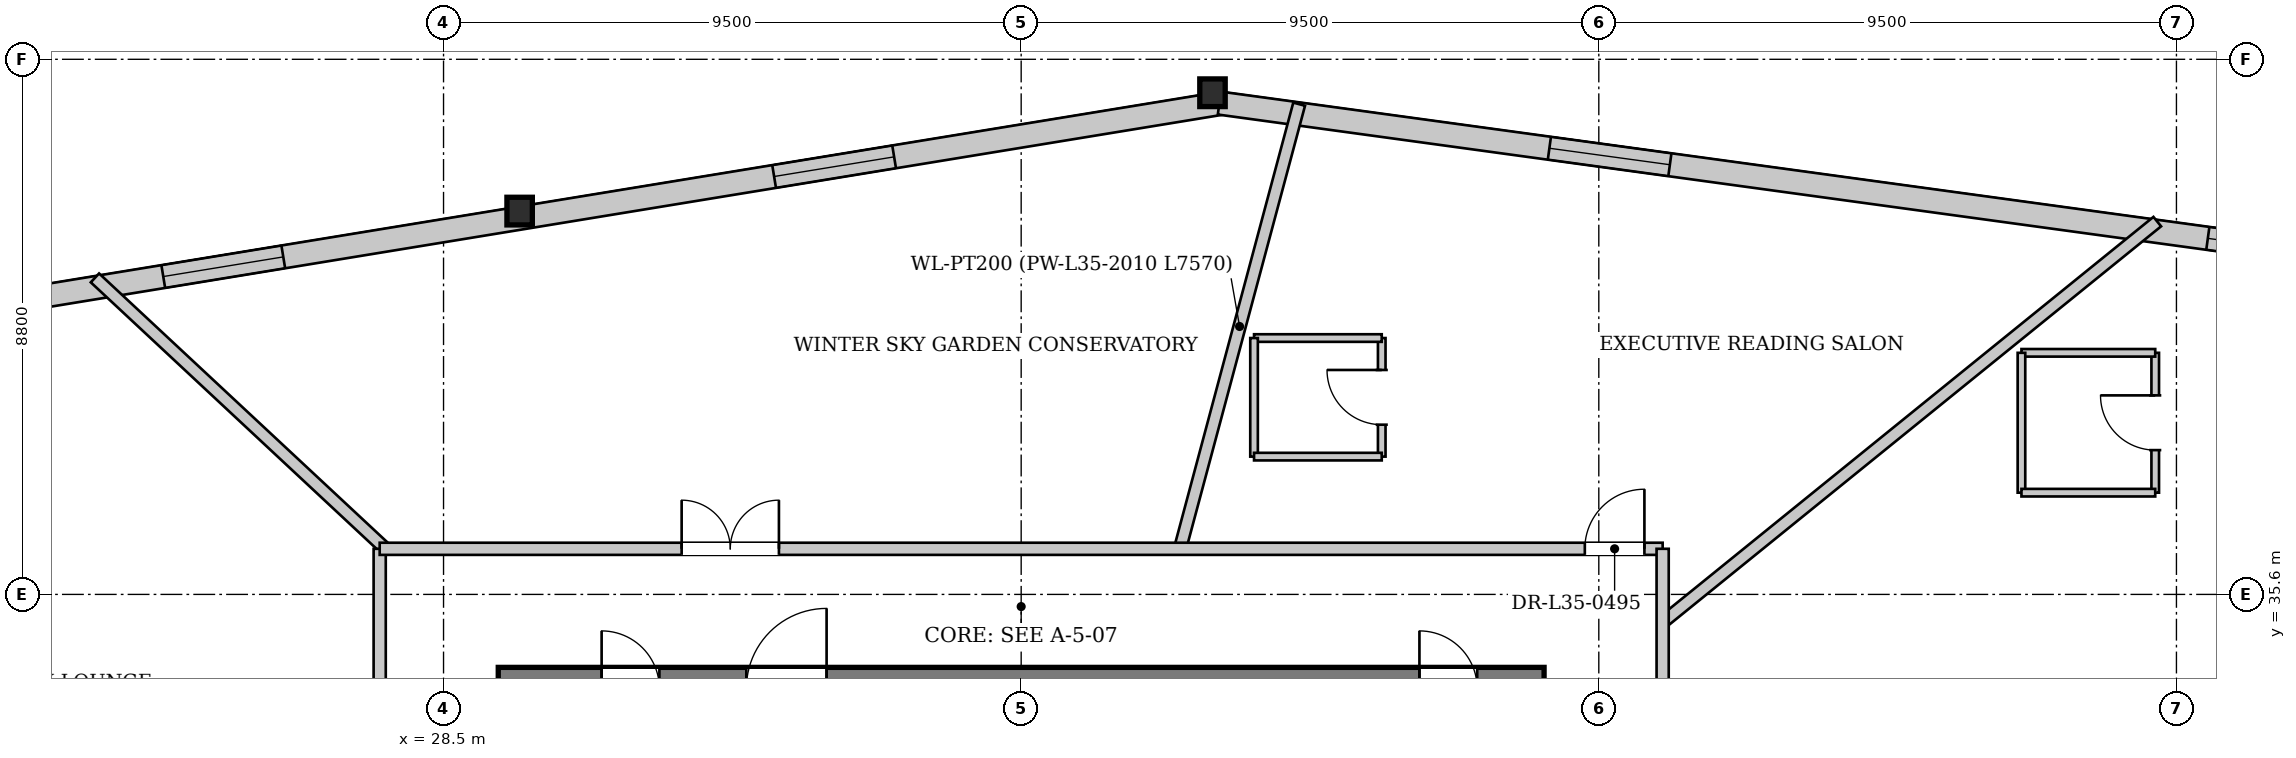
"""IFC4 building model, lengths in metres.
Left out: names, types, materials, properties, quantities, classifications, styles, units other than length and angle.
Written with IfcOpenShell. Run it as: python <this file> out.ifc"""

import sys

from ifc_helpers import new_model, si_unit, direction, frame, frame_2d, origin, origin_2d, place, context, subcontext, project, spatial, rectangle, i_section, extrude, source, transform, mapped, element, fill, save


model = new_model("IFC4")
c1 = context("Model", 3, precision=1e-05, world=origin(), true_north=direction((0.0, 1.0)))
c2 = subcontext(c1, "Body", "Model", "MODEL_VIEW")
j1 = project(units=[si_unit("LENGTHUNIT", "METRE"), si_unit("PLANEANGLEUNIT", "RADIAN")], contexts=[c1])
p1 = place(None, origin())
s1 = spatial("IfcSite", under=j1, at=p1, CompositionType="ELEMENT")
p2 = place(p1, origin())
s2 = spatial("IfcBuilding", under=s1, at=p2, CompositionType="ELEMENT")
p3 = place(p2, frame((0.0, 0.0, 134.1)))
s3 = spatial("IfcBuildingStorey", under=s2, at=p3, CompositionType="ELEMENT", Elevation=134.1)
m1 = source(origin(), c2, "Body", "SweptSolid", [
    extrude(i_section(OverallWidth=0.418, OverallDepth=0.455, WebThickness=0.038, FlangeThickness=0.059, at=origin_2d()), origin(), (0.0, 0.0, 1.0), 3.845),
])
p4 = place(p3, frame((41.286, 43.868, 0.0), z_axis=(-0.072380782417, -0.009587279074, 0.997330991405), x_axis=(0.131309262707, -0.99134145355, 0.0)))
e1 = element("IfcColumn", 1, at=p4, inside=s3, PredefinedType="COLUMN", context=c2, shape_type="MappedRepresentation", body=[
    mapped(m1, transform((0.0, 0.0, 0.0), x_axis=(1.0, 0.0, 0.0), y_axis=(0.0, 1.0, 0.0), z_axis=(0.0, 0.0, 1.0), scale=1.0)),
])
m2 = source(origin(), c2, "Body", "SweptSolid", [
    extrude(i_section(OverallWidth=0.418, OverallDepth=0.455, WebThickness=0.038, FlangeThickness=0.059, at=origin_2d()), origin(), (0.0, 0.0, 1.0), 3.847),
])
p5 = place(p3, frame((29.87, 41.999, 0.0), z_axis=(-0.061495980283, -0.049437944933, 0.996882206687), x_axis=(0.626556911825, -0.779375670806, 0.0)))
e2 = element("IfcColumn", 2, at=p5, inside=s3, PredefinedType="COLUMN", context=c2, shape_type="MappedRepresentation", body=[
    mapped(m2, transform((0.0, 0.0, 0.0), x_axis=(1.0, 0.0, 0.0), y_axis=(0.0, 1.0, 0.0), z_axis=(0.0, 0.0, 1.0), scale=1.0)),
])
p6 = place(p3, frame((18.485, 39.942, 0.0), z_axis=(0.0, 0.0, 1.0), x_axis=(0.986854577997, 0.161610772806, 0.0)))
e3 = element("IfcWall", 3, at=p6, inside=s3, PredefinedType="SOLIDWALL", context=c2, shape_type="SweptSolid", body=[
    extrude(rectangle(XDim=23.136, YDim=0.38, at=frame_2d((11.568, 0.0))), origin(), (0.0, 0.0, 1.0), 3.142),
])
p7 = place(p6, frame((5.478, 0.0, 0.222)))
e4 = element("IfcOpeningElement", 4, at=p7, cuts=e3, PredefinedType="OPENING", context=c2, shape_type="SweptSolid", body=[
    extrude(rectangle(XDim=2.0, YDim=2.8, at=frame_2d((1.0, 1.4))), frame((0.0, 0.2, 0.0), z_axis=(0.0, -1.0, 0.0), x_axis=(1.0, 0.0, 0.0)), (0.0, 0.0, 1.0), 0.4),
])
p8 = place(p6, frame((15.658, 0.0, 0.222)))
e5 = element("IfcOpeningElement", 5, at=p8, cuts=e3, PredefinedType="OPENING", context=c2, shape_type="SweptSolid", body=[
    extrude(rectangle(XDim=2.0, YDim=2.8, at=frame_2d((1.0, 1.4))), frame((0.0, 0.2, 0.0), z_axis=(0.0, -1.0, 0.0), x_axis=(1.0, 0.0, 0.0)), (0.0, 0.0, 1.0), 0.4),
])
p9 = place(p3, frame((41.26, 43.68, 0.0), z_axis=(0.0, 0.0, 1.0), x_axis=(0.990765133222, -0.135589272404, 0.0)))
e6 = element("IfcWall", 6, at=p9, inside=s3, PredefinedType="SOLIDWALL", context=c2, shape_type="SweptSolid", body=[
    extrude(rectangle(XDim=23.136, YDim=0.38, at=frame_2d((11.568, 0.0))), origin(), (0.0, 0.0, 1.0), 3.142),
])
p10 = place(p9, frame((5.478, 0.0, 0.222)))
e7 = element("IfcOpeningElement", 7, at=p10, cuts=e6, PredefinedType="OPENING", context=c2, shape_type="SweptSolid", body=[
    extrude(rectangle(XDim=2.0, YDim=2.8, at=frame_2d((1.0, 1.4))), frame((0.0, 0.2, 0.0), z_axis=(0.0, -1.0, 0.0), x_axis=(1.0, 0.0, 0.0)), (0.0, 0.0, 1.0), 0.4),
])
p11 = place(p9, frame((16.408, 0.0, 0.222)))
e8 = element("IfcOpeningElement", 8, at=p11, cuts=e6, PredefinedType="OPENING", context=c2, shape_type="SweptSolid", body=[
    extrude(rectangle(XDim=2.0, YDim=2.8, at=frame_2d((1.0, 1.4))), frame((0.0, 0.2, 0.0), z_axis=(0.0, -1.0, 0.0), x_axis=(1.0, 0.0, 0.0)), (0.0, 0.0, 1.0), 0.4),
])
p12 = place(p3, frame((65.586, 37.457, 0.0), z_axis=(0.0, 0.0, 1.0), x_axis=(-0.552197199058, -0.833713531947, 0.0)))
e9 = element("IfcWall", 9, at=p12, inside=s3, PredefinedType="SOLIDWALL", context=c2, shape_type="SweptSolid", body=[
    extrude(rectangle(XDim=23.726, YDim=0.38, at=frame_2d((11.863, 0.0))), origin(), (0.0, 0.0, 1.0), 3.142),
])
p13 = place(p12, frame((5.643, 0.0, 0.222)))
e10 = element("IfcOpeningElement", 10, at=p13, cuts=e9, PredefinedType="OPENING", context=c2, shape_type="SweptSolid", body=[
    extrude(rectangle(XDim=2.0, YDim=2.8, at=frame_2d((1.0, 1.4))), frame((0.0, 0.2, 0.0), z_axis=(0.0, -1.0, 0.0), x_axis=(1.0, 0.0, 0.0)), (0.0, 0.0, 1.0), 0.4),
])
p14 = place(p12, frame((16.082, 0.0, 0.222)))
e11 = element("IfcOpeningElement", 11, at=p14, cuts=e9, PredefinedType="OPENING", context=c2, shape_type="SweptSolid", body=[
    extrude(rectangle(XDim=2.0, YDim=2.8, at=frame_2d((1.0, 1.4))), frame((0.0, 0.2, 0.0), z_axis=(0.0, -1.0, 0.0), x_axis=(1.0, 0.0, 0.0)), (0.0, 0.0, 1.0), 0.4),
])
p15 = place(p3, frame((29.4, 34.05, 0.0), z_axis=(0.0, 0.0, 1.0), x_axis=(1.0, 0.0, 0.0)))
e12 = element("IfcWall", 12, at=p15, inside=s3, PredefinedType="SHEAR", context=c2, shape_type="SweptSolid", body=[
    extrude(rectangle(XDim=17.2, YDim=0.7, at=frame_2d((8.6, 0.0))), origin(), (0.0, 0.0, 1.0), 3.75),
])
p16 = place(p15, frame((1.7, 0.0, 0.0)))
e13 = element("IfcOpeningElement", 13, at=p16, cuts=e12, PredefinedType="OPENING", context=c2, shape_type="SweptSolid", body=[
    extrude(rectangle(XDim=0.95, YDim=2.1, at=frame_2d((0.475, 1.05))), frame((0.0, 0.36, 0.0), z_axis=(0.0, -1.0, 0.0), x_axis=(1.0, 0.0, 0.0)), (0.0, 0.0, 1.0), 0.72),
])
p17 = place(p15, frame((4.08, 0.0, 0.0)))
e14 = element("IfcOpeningElement", 14, at=p17, cuts=e12, PredefinedType="OPENING", context=c2, shape_type="SweptSolid", body=[
    extrude(rectangle(XDim=1.32, YDim=2.2, at=frame_2d((0.66, 1.1))), frame((0.0, 0.36, 0.0), z_axis=(0.0, -1.0, 0.0), x_axis=(1.0, 0.0, 0.0)), (0.0, 0.0, 1.0), 0.72),
])
p18 = place(p15, frame((15.15, 0.0, 0.0)))
e15 = element("IfcOpeningElement", 15, at=p18, cuts=e12, PredefinedType="OPENING", context=c2, shape_type="SweptSolid", body=[
    extrude(rectangle(XDim=0.95, YDim=2.1, at=frame_2d((0.475, 1.05))), frame((0.0, 0.36, 0.0), z_axis=(0.0, -1.0, 0.0), x_axis=(1.0, 0.0, 0.0)), (0.0, 0.0, 1.0), 0.72),
])
p19 = place(p3, frame((40.613, 36.35, 0.0), z_axis=(0.0, 0.0, 1.0), x_axis=(0.258816688586, 0.965926457713, 0.0)))
e16 = element("IfcWall", 16, at=p19, inside=s3, PredefinedType="PARTITIONING", context=c2, shape_type="SweptSolid", body=[
    extrude(rectangle(XDim=7.57, YDim=0.2, at=frame_2d((3.785, 0.0))), origin(), (0.0, 0.0, 1.0), 3.75),
])
p20 = place(p3, frame((27.544, 36.35, 0.0), z_axis=(0.0, 0.0, 1.0), x_axis=(-0.731359670855, 0.681991958785, 0.0)))
e17 = element("IfcWall", 17, at=p20, inside=s3, PredefinedType="PARTITIONING", context=c2, shape_type="SweptSolid", body=[
    extrude(rectangle(XDim=6.533, YDim=0.2, at=frame_2d((3.266, 0.0))), origin(), (0.0, 0.0, 1.0), 3.75),
])
p21 = place(p3, frame((48.55, 35.143, 0.0), z_axis=(0.0, 0.0, 1.0), x_axis=(0.777146006926, 0.6293203349, 0.0)))
e18 = element("IfcWall", 18, at=p21, inside=s3, PredefinedType="PARTITIONING", context=c2, shape_type="SweptSolid", body=[
    extrude(rectangle(XDim=10.468, YDim=0.2, at=frame_2d((5.234, 0.0))), origin(), (0.0, 0.0, 1.0), 3.75),
])
p22 = place(p3, frame((56.651, 37.273, 0.0), z_axis=(0.0, 0.0, 1.0), x_axis=(0.0, 1.0, 0.0)))
e19 = element("IfcWall", 19, at=p22, inside=s3, PredefinedType="PARTITIONING", context=c2, shape_type="SweptSolid", body=[
    extrude(rectangle(XDim=2.3, YDim=0.125, at=frame_2d((1.15, 0.0))), origin(), (0.0, 0.0, 1.0), 3.75),
])
p23 = place(p22, frame((0.7, 0.0, 0.0)))
e20 = element("IfcOpeningElement", 20, at=p23, cuts=e19, PredefinedType="OPENING", context=c2, shape_type="SweptSolid", body=[
    extrude(rectangle(XDim=0.9, YDim=2.1, at=frame_2d((0.45, 1.05))), frame((0.0, 0.073, 0.0), z_axis=(0.0, -1.0, 0.0), x_axis=(1.0, 0.0, 0.0)), (0.0, 0.0, 1.0), 0.145),
])
p24 = place(p3, frame((56.651, 39.573, 0.0), z_axis=(0.0, 0.0, 1.0), x_axis=(-1.0, 0.0, 0.0)))
e21 = element("IfcWall", 21, at=p24, inside=s3, PredefinedType="PARTITIONING", context=c2, shape_type="SweptSolid", body=[
    extrude(rectangle(XDim=2.2, YDim=0.125, at=frame_2d((1.1, 0.0))), origin(), (0.0, 0.0, 1.0), 3.75),
])
p25 = place(p3, frame((54.451, 39.573, 0.0), z_axis=(0.0, 0.0, 1.0), x_axis=(0.0, -1.0, 0.0)))
e22 = element("IfcWall", 22, at=p25, inside=s3, PredefinedType="PARTITIONING", context=c2, shape_type="SweptSolid", body=[
    extrude(rectangle(XDim=2.3, YDim=0.125, at=frame_2d((1.15, 0.0))), origin(), (0.0, 0.0, 1.0), 3.75),
])
p26 = place(p3, frame((54.451, 37.273, 0.0), z_axis=(0.0, 0.0, 1.0), x_axis=(1.0, 0.0, 0.0)))
e23 = element("IfcWall", 23, at=p26, inside=s3, PredefinedType="PARTITIONING", context=c2, shape_type="SweptSolid", body=[
    extrude(rectangle(XDim=2.2, YDim=0.125, at=frame_2d((1.1, 0.0))), origin(), (0.0, 0.0, 1.0), 3.75),
])
p27 = place(p3, frame((43.93, 37.866, 0.0), z_axis=(0.0, 0.0, 1.0), x_axis=(0.0, 1.0, 0.0)))
e24 = element("IfcWall", 24, at=p27, inside=s3, PredefinedType="PARTITIONING", context=c2, shape_type="SweptSolid", body=[
    extrude(rectangle(XDim=1.95, YDim=0.125, at=frame_2d((0.975, 0.0))), origin(), (0.0, 0.0, 1.0), 3.75),
])
p28 = place(p27, frame((0.525, 0.0, 0.0)))
e25 = element("IfcOpeningElement", 25, at=p28, cuts=e24, PredefinedType="OPENING", context=c2, shape_type="SweptSolid", body=[
    extrude(rectangle(XDim=0.9, YDim=2.1, at=frame_2d((0.45, 1.05))), frame((0.0, 0.073, 0.0), z_axis=(0.0, -1.0, 0.0), x_axis=(1.0, 0.0, 0.0)), (0.0, 0.0, 1.0), 0.145),
])
p29 = place(p3, frame((43.93, 39.816, 0.0), z_axis=(0.0, 0.0, 1.0), x_axis=(-1.0, 0.0, 0.0)))
e26 = element("IfcWall", 26, at=p29, inside=s3, PredefinedType="PARTITIONING", context=c2, shape_type="SweptSolid", body=[
    extrude(rectangle(XDim=2.1, YDim=0.125, at=frame_2d((1.05, 0.0))), origin(), (0.0, 0.0, 1.0), 3.75),
])
p30 = place(p3, frame((41.83, 39.816, 0.0), z_axis=(0.0, 0.0, 1.0), x_axis=(0.0, -1.0, 0.0)))
e27 = element("IfcWall", 27, at=p30, inside=s3, PredefinedType="PARTITIONING", context=c2, shape_type="SweptSolid", body=[
    extrude(rectangle(XDim=1.95, YDim=0.125, at=frame_2d((0.975, 0.0))), origin(), (0.0, 0.0, 1.0), 3.75),
])
p31 = place(p3, frame((41.83, 37.866, 0.0), z_axis=(0.0, 0.0, 1.0), x_axis=(1.0, 0.0, 0.0)))
e28 = element("IfcWall", 28, at=p31, inside=s3, PredefinedType="PARTITIONING", context=c2, shape_type="SweptSolid", body=[
    extrude(rectangle(XDim=2.1, YDim=0.125, at=frame_2d((1.05, 0.0))), origin(), (0.0, 0.0, 1.0), 3.75),
])
p32 = place(p3, frame((27.45, 16.85, 0.0), z_axis=(0.0, 0.0, 1.0), x_axis=(0.0, 1.0, 0.0)))
e29 = element("IfcWall", 29, at=p32, inside=s3, PredefinedType="PARTITIONING", context=c2, shape_type="SweptSolid", body=[
    extrude(rectangle(XDim=19.5, YDim=0.2, at=frame_2d((9.75, 0.0))), origin(), (0.0, 0.0, 1.0), 3.75),
])
p33 = place(p32, frame((12.66, 0.0, 0.0)))
e30 = element("IfcOpeningElement", 30, at=p33, cuts=e29, PredefinedType="OPENING", context=c2, shape_type="SweptSolid", body=[
    extrude(rectangle(XDim=0.98, YDim=2.15, at=frame_2d((0.49, 1.075))), frame((0.0, 0.11, 0.0), z_axis=(0.0, -1.0, 0.0), x_axis=(1.0, 0.0, 0.0)), (0.0, 0.0, 1.0), 0.22),
])
p34 = place(p3, frame((27.45, 36.35, 0.0), z_axis=(0.0, 0.0, 1.0), x_axis=(1.0, 0.0, 0.0)))
e31 = element("IfcWall", 31, at=p34, inside=s3, PredefinedType="PARTITIONING", context=c2, shape_type="SweptSolid", body=[
    extrude(rectangle(XDim=21.1, YDim=0.2, at=frame_2d((10.55, 0.0))), origin(), (0.0, 0.0, 1.0), 3.75),
])
p35 = place(p34, frame((4.966, 0.0, 0.0)))
e32 = element("IfcOpeningElement", 32, at=p35, cuts=e31, PredefinedType="OPENING", context=c2, shape_type="SweptSolid", body=[
    extrude(rectangle(XDim=1.6, YDim=2.2, at=frame_2d((0.8, 1.1))), frame((0.0, 0.11, 0.0), z_axis=(0.0, -1.0, 0.0), x_axis=(1.0, 0.0, 0.0)), (0.0, 0.0, 1.0), 0.22),
])
p36 = place(p34, frame((19.82, 0.0, 0.0)))
e33 = element("IfcOpeningElement", 33, at=p36, cuts=e31, PredefinedType="OPENING", context=c2, shape_type="SweptSolid", body=[
    extrude(rectangle(XDim=0.98, YDim=2.15, at=frame_2d((0.49, 1.075))), frame((0.0, 0.11, 0.0), z_axis=(0.0, -1.0, 0.0), x_axis=(1.0, 0.0, 0.0)), (0.0, 0.0, 1.0), 0.22),
])
p37 = place(p3, frame((48.55, 16.85, 0.0), z_axis=(0.0, 0.0, 1.0), x_axis=(0.0, 1.0, 0.0)))
e34 = element("IfcWall", 34, at=p37, inside=s3, PredefinedType="PARTITIONING", context=c2, shape_type="SweptSolid", body=[
    extrude(rectangle(XDim=19.5, YDim=0.2, at=frame_2d((9.75, 0.0))), origin(), (0.0, 0.0, 1.0), 3.75),
])
p38 = place(p37, frame((13.106, 0.0, 0.0)))
e35 = element("IfcOpeningElement", 35, at=p38, cuts=e34, PredefinedType="OPENING", context=c2, shape_type="SweptSolid", body=[
    extrude(rectangle(XDim=0.98, YDim=2.15, at=frame_2d((0.49, 1.075))), frame((0.0, 0.11, 0.0), z_axis=(0.0, -1.0, 0.0), x_axis=(1.0, 0.0, 0.0)), (0.0, 0.0, 1.0), 0.22),
])
m3 = source(origin(), c2, "Body", "SweptSolid", [
    extrude(rectangle(XDim=2.0, YDim=2.8, at=frame_2d((1.0, 1.4))), frame((0.0, 0.03, 0.0), z_axis=(0.0, -1.0, 0.0), x_axis=(1.0, 0.0, 0.0)), (0.0, 0.0, 1.0), 0.06),
])
p39 = place(p7, origin())
e36 = element("IfcWindow", 36, at=p39, inside=s3, PartitioningType="SINGLE_PANEL", PredefinedType="WINDOW", context=c2, shape_type="MappedRepresentation", body=[
    mapped(m3, transform((0.0, 0.0, 0.0), x_axis=(1.0, 0.0, 0.0), y_axis=(0.0, 1.0, 0.0), z_axis=(0.0, 0.0, 1.0), scale=1.0)),
])
fill(e4, e36)
p40 = place(p8, origin())
e37 = element("IfcWindow", 37, at=p40, inside=s3, PartitioningType="SINGLE_PANEL", PredefinedType="WINDOW", context=c2, shape_type="MappedRepresentation", body=[
    mapped(m3, transform((0.0, 0.0, 0.0), x_axis=(1.0, 0.0, 0.0), y_axis=(0.0, 1.0, 0.0), z_axis=(0.0, 0.0, 1.0), scale=1.0)),
])
fill(e5, e37)
p41 = place(p10, origin())
e38 = element("IfcWindow", 38, at=p41, inside=s3, PartitioningType="SINGLE_PANEL", PredefinedType="WINDOW", context=c2, shape_type="MappedRepresentation", body=[
    mapped(m3, transform((0.0, 0.0, 0.0), x_axis=(1.0, 0.0, 0.0), y_axis=(0.0, 1.0, 0.0), z_axis=(0.0, 0.0, 1.0), scale=1.0)),
])
fill(e7, e38)
p42 = place(p11, origin())
e39 = element("IfcWindow", 39, at=p42, inside=s3, PartitioningType="SINGLE_PANEL", PredefinedType="WINDOW", context=c2, shape_type="MappedRepresentation", body=[
    mapped(m3, transform((0.0, 0.0, 0.0), x_axis=(1.0, 0.0, 0.0), y_axis=(0.0, 1.0, 0.0), z_axis=(0.0, 0.0, 1.0), scale=1.0)),
])
fill(e8, e39)
m4 = source(origin(), c2, "Body", "SweptSolid", [
    extrude(rectangle(XDim=0.9, YDim=2.1, at=frame_2d((0.45, 1.05))), frame((0.0, 0.025, 0.0), z_axis=(0.0, -1.0, 0.0), x_axis=(1.0, 0.0, 0.0)), (0.0, 0.0, 1.0), 0.05),
])
p43 = place(p23, origin())
e40 = element("IfcDoor", 40, at=p43, inside=s3, OperationType="SINGLE_SWING_RIGHT", PredefinedType="DOOR", context=c2, shape_type="MappedRepresentation", body=[
    mapped(m4, transform((0.0, 0.0, 0.0), x_axis=(1.0, 0.0, 0.0), y_axis=(0.0, 1.0, 0.0), z_axis=(0.0, 0.0, 1.0), scale=1.0)),
])
fill(e20, e40)
p44 = place(p28, origin())
e41 = element("IfcDoor", 41, at=p44, inside=s3, OperationType="SINGLE_SWING_RIGHT", PredefinedType="DOOR", context=c2, shape_type="MappedRepresentation", body=[
    mapped(m4, transform((0.0, 0.0, 0.0), x_axis=(1.0, 0.0, 0.0), y_axis=(0.0, 1.0, 0.0), z_axis=(0.0, 0.0, 1.0), scale=1.0)),
])
fill(e25, e41)
m5 = source(origin(), c2, "Body", "SweptSolid", [
    extrude(rectangle(XDim=1.6, YDim=2.2, at=frame_2d((0.8, 1.1))), frame((0.0, 0.025, 0.0), z_axis=(0.0, -1.0, 0.0), x_axis=(1.0, 0.0, 0.0)), (0.0, 0.0, 1.0), 0.05),
])
p45 = place(p35, origin())
e42 = element("IfcDoor", 42, at=p45, inside=s3, OperationType="DOUBLE_DOOR_SINGLE_SWING", PredefinedType="DOOR", context=c2, shape_type="MappedRepresentation", body=[
    mapped(m5, transform((0.0, 0.0, 0.0), x_axis=(1.0, 0.0, 0.0), y_axis=(0.0, 1.0, 0.0), z_axis=(0.0, 0.0, 1.0), scale=1.0)),
])
fill(e32, e42)
m6 = source(origin(), c2, "Body", "SweptSolid", [
    extrude(rectangle(XDim=0.98, YDim=2.15, at=frame_2d((0.49, 1.075))), frame((0.0, 0.025, 0.0), z_axis=(0.0, -1.0, 0.0), x_axis=(1.0, 0.0, 0.0)), (0.0, 0.0, 1.0), 0.05),
])
p46 = place(p36, origin())
e43 = element("IfcDoor", 43, at=p46, inside=s3, OperationType="SINGLE_SWING_RIGHT", PredefinedType="DOOR", context=c2, shape_type="MappedRepresentation", body=[
    mapped(m6, transform((0.0, 0.0, 0.0), x_axis=(1.0, 0.0, 0.0), y_axis=(0.0, 1.0, 0.0), z_axis=(0.0, 0.0, 1.0), scale=1.0)),
])
fill(e33, e43)
save(model, sys.argv[1])
